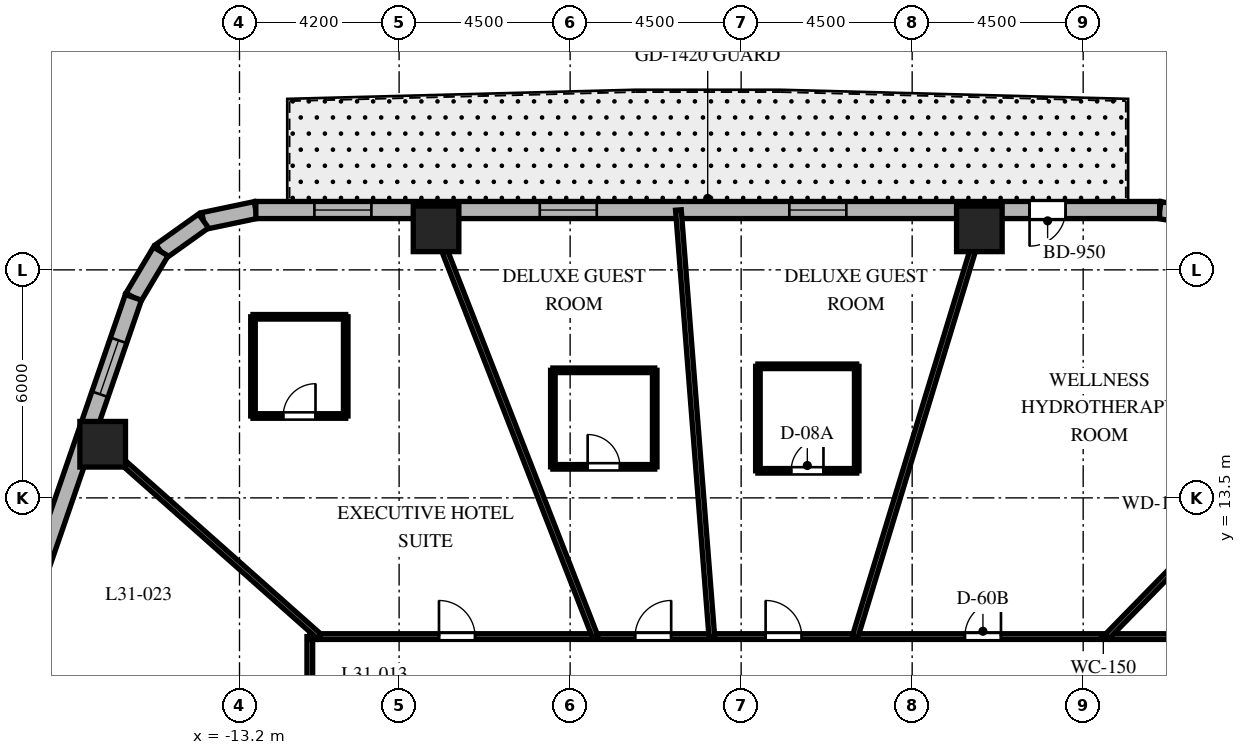
"""IFC4 building model, lengths in metres.
Left out: names, types, materials, properties, quantities, classifications, styles, units other than length and angle.
Written with IfcOpenShell. Run it as: python <this file> out.ifc"""

import sys

from ifc_helpers import new_model, si_unit, direction, frame, frame_2d, origin, origin_2d, place, context, subcontext, project, spatial, rectangle, extrude, element, fill, save


model = new_model("IFC4")
c1 = context("Model", 3, precision=1e-05, world=origin(), true_north=direction((0.0, 1.0)))
c2 = subcontext(c1, "Body", "Model", "MODEL_VIEW")
j1 = project(units=[si_unit("LENGTHUNIT", "METRE"), si_unit("PLANEANGLEUNIT", "RADIAN")], contexts=[c1])
p1 = place(None, origin())
s1 = spatial("IfcSite", under=j1, at=p1, CompositionType="ELEMENT")
p2 = place(p1, origin())
s2 = spatial("IfcBuilding", under=s1, at=p2, CompositionType="ELEMENT")
p3 = place(p2, frame((0.0, 0.0, 128.4)))
s3 = spatial("IfcBuildingStorey", under=s2, at=p3, CompositionType="ELEMENT", Elevation=128.4)
for number, where, z_axis, x_axis in (
    (1, (6.268, 20.58, 0.0), (0.0, 0.0, 1.0), (1.0, 0.0, 0.0)),
    (2, (-8.028, 20.58, 0.0), (0.0, 0.0, 1.0), (1.0, 0.0, 0.0)),
    (3, (-16.8, 14.911, 0.0), (0.0, 0.0, 1.0), (1.0, 0.0, 0.0)),
):
    element("IfcColumn", number, at=place(p3, frame(where, z_axis=z_axis, x_axis=x_axis)), inside=s3, PredefinedType="COLUMN", context=c2, shape_type="SweptSolid", body=[
        extrude(rectangle(XDim=1.2, YDim=1.2, at=origin_2d()), origin(), (0.0, 0.0, 1.0), 3.7),
    ])
p4 = place(p3, frame((12.259, 20.84, 0.0), z_axis=(0.0, 0.0, 1.0), x_axis=(-0.982730354425, 0.185043374624, 0.0)))
e4 = element("IfcWall", 4, at=p4, inside=s3, PredefinedType="SOLIDWALL", context=c2, shape_type="SweptSolid", body=[
    extrude(rectangle(XDim=1.269, YDim=0.45, at=frame_2d((0.635, 0.0))), origin(), (0.0, 0.0, 1.0), 3.4),
])
p5 = place(p3, frame((-12.771, 21.075, 0.0), z_axis=(0.0, 0.0, 1.0), x_axis=(-0.97874281988, -0.205091424819, 0.0)))
e5 = element("IfcWall", 5, at=p5, inside=s3, PredefinedType="SOLIDWALL", context=c2, shape_type="SweptSolid", body=[
    extrude(rectangle(XDim=1.406, YDim=0.45, at=frame_2d((0.703, 0.0))), origin(), (0.0, 0.0, 1.0), 3.4),
])
p6 = place(p3, frame((-14.146, 20.787, 0.0), z_axis=(0.0, 0.0, 1.0), x_axis=(-0.814162929117, -0.580636482536, 0.0)))
e6 = element("IfcWall", 6, at=p6, inside=s3, PredefinedType="SOLIDWALL", context=c2, shape_type="SweptSolid", body=[
    extrude(rectangle(XDim=1.382, YDim=0.45, at=frame_2d((0.691, 0.0))), origin(), (0.0, 0.0, 1.0), 3.4),
])
p7 = place(p3, frame((-15.272, 19.984, 0.0), z_axis=(0.0, 0.0, 1.0), x_axis=(-0.512579347361, -0.858639862025, 0.0)))
e7 = element("IfcWall", 7, at=p7, inside=s3, PredefinedType="SOLIDWALL", context=c2, shape_type="SweptSolid", body=[
    extrude(rectangle(XDim=1.406, YDim=0.45, at=frame_2d((0.703, 0.0))), origin(), (0.0, 0.0, 1.0), 3.4),
])
p8 = place(p3, frame((11.012, 21.075, 0.0), z_axis=(0.0, 0.0, 1.0), x_axis=(-1.0, 0.0, 0.0)))
e8 = element("IfcWall", 8, at=p8, inside=s3, PredefinedType="SOLIDWALL", context=c2, shape_type="SweptSolid", body=[
    extrude(rectangle(XDim=23.782, YDim=0.45, at=frame_2d((11.891, 0.0))), origin(), (0.0, 0.0, 1.0), 3.4),
])
p9 = place(p8, frame((2.473, 0.0, 0.0)))
e9 = element("IfcOpeningElement", 9, at=p9, cuts=e8, PredefinedType="OPENING", context=c2, shape_type="SweptSolid", body=[
    extrude(rectangle(XDim=0.95, YDim=2.15, at=frame_2d((0.475, 1.075))), frame((0.0, 0.235, 0.0), z_axis=(0.0, -1.0, 0.0), x_axis=(1.0, 0.0, 0.0)), (0.0, 0.0, 1.0), 0.47),
])
p10 = place(p8, frame((8.244, 0.0, 0.8)))
e10 = element("IfcOpeningElement", 10, at=p10, cuts=e8, PredefinedType="OPENING", context=c2, shape_type="SweptSolid", body=[
    extrude(rectangle(XDim=1.5, YDim=1.8, at=frame_2d((0.75, 0.9))), frame((0.0, 0.235, 0.0), z_axis=(0.0, -1.0, 0.0), x_axis=(1.0, 0.0, 0.0)), (0.0, 0.0, 1.0), 0.47),
])
p11 = place(p8, frame((14.811, 0.0, 0.8)))
e11 = element("IfcOpeningElement", 11, at=p11, cuts=e8, PredefinedType="OPENING", context=c2, shape_type="SweptSolid", body=[
    extrude(rectangle(XDim=1.5, YDim=1.8, at=frame_2d((0.75, 0.9))), frame((0.0, 0.235, 0.0), z_axis=(0.0, -1.0, 0.0), x_axis=(1.0, 0.0, 0.0)), (0.0, 0.0, 1.0), 0.47),
])
p12 = place(p8, frame((20.741, 0.0, 0.8)))
e12 = element("IfcOpeningElement", 12, at=p12, cuts=e8, PredefinedType="OPENING", context=c2, shape_type="SweptSolid", body=[
    extrude(rectangle(XDim=1.5, YDim=1.8, at=frame_2d((0.75, 0.9))), frame((0.0, 0.235, 0.0), z_axis=(0.0, -1.0, 0.0), x_axis=(1.0, 0.0, 0.0)), (0.0, 0.0, 1.0), 0.47),
])
p13 = place(p3, frame((-15.992, 18.777, 0.0), z_axis=(0.0, 0.0, 1.0), x_axis=(-0.325606988926, -0.945505202927, 0.0)))
e13 = element("IfcWall", 13, at=p13, inside=s3, PredefinedType="SOLIDWALL", context=c2, shape_type="SweptSolid", body=[
    extrude(rectangle(XDim=19.669, YDim=0.45, at=frame_2d((9.835, 0.0))), origin(), (0.0, 0.0, 1.0), 3.4),
])
p14 = place(p13, frame((1.197, 0.0, 0.8)))
e14 = element("IfcOpeningElement", 14, at=p14, cuts=e13, PredefinedType="OPENING", context=c2, shape_type="SweptSolid", body=[
    extrude(rectangle(XDim=1.5, YDim=1.8, at=frame_2d((0.75, 0.9))), frame((0.0, 0.235, 0.0), z_axis=(0.0, -1.0, 0.0), x_axis=(1.0, 0.0, 0.0)), (0.0, 0.0, 1.0), 0.47),
])
p15 = place(p13, frame((9.03, 0.0, 0.8)))
e15 = element("IfcOpeningElement", 15, at=p15, cuts=e13, PredefinedType="OPENING", context=c2, shape_type="SweptSolid", body=[
    extrude(rectangle(XDim=1.5, YDim=1.8, at=frame_2d((0.75, 0.9))), frame((0.0, 0.235, 0.0), z_axis=(0.0, -1.0, 0.0), x_axis=(1.0, 0.0, 0.0)), (0.0, 0.0, 1.0), 0.47),
])
p16 = place(p13, frame((16.918, 0.0, 0.8)))
e16 = element("IfcOpeningElement", 16, at=p16, cuts=e13, PredefinedType="OPENING", context=c2, shape_type="SweptSolid", body=[
    extrude(rectangle(XDim=1.5, YDim=1.8, at=frame_2d((0.75, 0.9))), frame((0.0, 0.235, 0.0), z_axis=(0.0, -1.0, 0.0), x_axis=(1.0, 0.0, 0.0)), (0.0, 0.0, 1.0), 0.47),
])
p17 = place(p3, frame((-11.35, -9.85, 0.0), z_axis=(0.0, 0.0, 1.0), x_axis=(0.0, 1.0, 0.0)))
e17 = element("IfcWall", 17, at=p17, inside=s3, PredefinedType="PARTITIONING", context=c2, shape_type="SweptSolid", body=[
    extrude(rectangle(XDim=19.7, YDim=0.15, at=frame_2d((9.85, 0.0))), origin(), (0.0, 0.0, 1.0), 2.84),
])
p18 = place(p17, frame((15.205, 0.0, 0.0)))
e18 = element("IfcOpeningElement", 18, at=p18, cuts=e17, PredefinedType="OPENING", context=c2, shape_type="SweptSolid", body=[
    extrude(rectangle(XDim=0.95, YDim=2.03, at=frame_2d((0.475, 1.015))), frame((0.0, 0.085, 0.0), z_axis=(0.0, -1.0, 0.0), x_axis=(1.0, 0.0, 0.0)), (0.0, 0.0, 1.0), 0.17),
])
p19 = place(p17, frame((8.836, 0.0, 0.0)))
e19 = element("IfcOpeningElement", 19, at=p19, cuts=e17, PredefinedType="OPENING", context=c2, shape_type="SweptSolid", body=[
    extrude(rectangle(XDim=0.95, YDim=2.03, at=frame_2d((0.475, 1.015))), frame((0.0, 0.085, 0.0), z_axis=(0.0, -1.0, 0.0), x_axis=(1.0, 0.0, 0.0)), (0.0, 0.0, 1.0), 0.17),
])
p20 = place(p17, frame((3.008, 0.0, 0.0)))
e20 = element("IfcOpeningElement", 20, at=p20, cuts=e17, PredefinedType="OPENING", context=c2, shape_type="SweptSolid", body=[
    extrude(rectangle(XDim=0.95, YDim=2.03, at=frame_2d((0.475, 1.015))), frame((0.0, 0.085, 0.0), z_axis=(0.0, -1.0, 0.0), x_axis=(1.0, 0.0, 0.0)), (0.0, 0.0, 1.0), 0.17),
])
p21 = place(p3, frame((-11.35, 9.85, 0.0), z_axis=(0.0, 0.0, 1.0), x_axis=(1.0, 0.0, 0.0)))
e21 = element("IfcWall", 21, at=p21, inside=s3, PredefinedType="PARTITIONING", context=c2, shape_type="SweptSolid", body=[
    extrude(rectangle(XDim=22.7, YDim=0.15, at=frame_2d((11.35, 0.0))), origin(), (0.0, 0.0, 1.0), 2.84),
])
p22 = place(p21, frame((17.237, 0.0, 0.0)))
e22 = element("IfcOpeningElement", 22, at=p22, cuts=e21, PredefinedType="OPENING", context=c2, shape_type="SweptSolid", body=[
    extrude(rectangle(XDim=0.95, YDim=2.03, at=frame_2d((0.475, 1.015))), frame((0.0, 0.085, 0.0), z_axis=(0.0, -1.0, 0.0), x_axis=(1.0, 0.0, 0.0)), (0.0, 0.0, 1.0), 0.17),
])
p23 = place(p21, frame((11.994, 0.0, 0.0)))
e23 = element("IfcOpeningElement", 23, at=p23, cuts=e21, PredefinedType="OPENING", context=c2, shape_type="SweptSolid", body=[
    extrude(rectangle(XDim=0.95, YDim=2.03, at=frame_2d((0.475, 1.015))), frame((0.0, 0.085, 0.0), z_axis=(0.0, -1.0, 0.0), x_axis=(1.0, 0.0, 0.0)), (0.0, 0.0, 1.0), 0.17),
])
p24 = place(p21, frame((8.559, 0.0, 0.0)))
e24 = element("IfcOpeningElement", 24, at=p24, cuts=e21, PredefinedType="OPENING", context=c2, shape_type="SweptSolid", body=[
    extrude(rectangle(XDim=0.95, YDim=2.03, at=frame_2d((0.475, 1.015))), frame((0.0, 0.085, 0.0), z_axis=(0.0, -1.0, 0.0), x_axis=(1.0, 0.0, 0.0)), (0.0, 0.0, 1.0), 0.17),
])
p25 = place(p21, frame((3.399, 0.0, 0.0)))
e25 = element("IfcOpeningElement", 25, at=p25, cuts=e21, PredefinedType="OPENING", context=c2, shape_type="SweptSolid", body=[
    extrude(rectangle(XDim=0.95, YDim=2.03, at=frame_2d((0.475, 1.015))), frame((0.0, 0.085, 0.0), z_axis=(0.0, -1.0, 0.0), x_axis=(1.0, 0.0, 0.0)), (0.0, 0.0, 1.0), 0.17),
])
p26 = place(p3, frame((9.628, 9.85, 0.0), z_axis=(0.0, 0.0, 1.0), x_axis=(0.698992824326, 0.715128681805, 0.0)))
e26 = element("IfcWall", 26, at=p26, inside=s3, PredefinedType="PARTITIONING", context=c2, shape_type="SweptSolid", body=[
    extrude(rectangle(XDim=8.579, YDim=0.15, at=frame_2d((4.29, 0.0))), origin(), (0.0, 0.0, 1.0), 2.54),
])
p27 = place(p3, frame((3.0, 9.85, 0.0), z_axis=(0.0, 0.0, 1.0), x_axis=(0.291352035382, 0.95661590593, 0.0)))
e27 = element("IfcWall", 27, at=p27, inside=s3, PredefinedType="PARTITIONING", context=c2, shape_type="SweptSolid", body=[
    extrude(rectangle(XDim=11.734, YDim=0.15, at=frame_2d((5.867, 0.0))), origin(), (0.0, 0.0, 1.0), 2.54),
])
p28 = place(p3, frame((-0.772, 9.85, 0.0), z_axis=(0.0, 0.0, 1.0), x_axis=(-0.078125747145, 0.996943512759, 0.0)))
e28 = element("IfcWall", 28, at=p28, inside=s3, PredefinedType="PARTITIONING", context=c2, shape_type="SweptSolid", body=[
    extrude(rectangle(XDim=11.259, YDim=0.15, at=frame_2d((5.63, 0.0))), origin(), (0.0, 0.0, 1.0), 2.54),
])
p29 = place(p3, frame((-3.842, 9.85, 0.0), z_axis=(0.0, 0.0, 1.0), x_axis=(-0.363432685593, 0.931620460833, 0.0)))
e29 = element("IfcWall", 29, at=p29, inside=s3, PredefinedType="PARTITIONING", context=c2, shape_type="SweptSolid", body=[
    extrude(rectangle(XDim=12.049, YDim=0.15, at=frame_2d((6.024, 0.0))), origin(), (0.0, 0.0, 1.0), 2.54),
])
p30 = place(p3, frame((-11.098, 9.85, 0.0), z_axis=(0.0, 0.0, 1.0), x_axis=(-0.747904295103, 0.663806572253, 0.0)))
e30 = element("IfcWall", 30, at=p30, inside=s3, PredefinedType="PARTITIONING", context=c2, shape_type="SweptSolid", body=[
    extrude(rectangle(XDim=8.16, YDim=0.15, at=frame_2d((4.08, 0.0))), origin(), (0.0, 0.0, 1.0), 2.54),
])
p31 = place(p3, frame((0.441, 14.212, 0.0), z_axis=(0.0, 0.0, 1.0), x_axis=(1.0, 0.0, 0.0)))
e31 = element("IfcWall", 31, at=p31, inside=s3, PredefinedType="PARTITIONING", context=c2, shape_type="SweptSolid", body=[
    extrude(rectangle(XDim=2.6, YDim=0.12, at=frame_2d((1.3, 0.0))), origin(), (0.0, 0.0, 1.0), 3.4),
])
p32 = place(p31, frame((0.875, 0.0, 0.0)))
e32 = element("IfcOpeningElement", 32, at=p32, cuts=e31, PredefinedType="OPENING", context=c2, shape_type="SweptSolid", body=[
    extrude(rectangle(XDim=0.85, YDim=2.03, at=frame_2d((0.425, 1.015))), frame((0.0, 0.07, 0.0), z_axis=(0.0, -1.0, 0.0), x_axis=(1.0, 0.0, 0.0)), (0.0, 0.0, 1.0), 0.14),
])
p33 = place(p3, frame((3.041, 14.212, 0.0), z_axis=(0.0, 0.0, 1.0), x_axis=(0.0, 1.0, 0.0)))
e33 = element("IfcWall", 33, at=p33, inside=s3, PredefinedType="PARTITIONING", context=c2, shape_type="SweptSolid", body=[
    extrude(rectangle(XDim=2.75, YDim=0.12, at=frame_2d((1.375, 0.0))), origin(), (0.0, 0.0, 1.0), 2.841),
])
p34 = place(p3, frame((3.041, 16.962, 0.0), z_axis=(0.0, 0.0, 1.0), x_axis=(-1.0, 0.0, 0.0)))
e34 = element("IfcWall", 34, at=p34, inside=s3, PredefinedType="PARTITIONING", context=c2, shape_type="SweptSolid", body=[
    extrude(rectangle(XDim=2.6, YDim=0.12, at=frame_2d((1.3, 0.0))), origin(), (0.0, 0.0, 1.0), 3.4),
])
p35 = place(p3, frame((0.441, 16.962, 0.0), z_axis=(0.0, 0.0, 1.0), x_axis=(0.0, -1.0, 0.0)))
e35 = element("IfcWall", 35, at=p35, inside=s3, PredefinedType="PARTITIONING", context=c2, shape_type="SweptSolid", body=[
    extrude(rectangle(XDim=2.75, YDim=0.12, at=frame_2d((1.375, 0.0))), origin(), (0.0, 0.0, 1.0), 2.841),
])
p36 = place(p3, frame((-4.954, 14.317, 0.0), z_axis=(0.0, 0.0, 1.0), x_axis=(1.0, 0.0, 0.0)))
e36 = element("IfcWall", 36, at=p36, inside=s3, PredefinedType="PARTITIONING", context=c2, shape_type="SweptSolid", body=[
    extrude(rectangle(XDim=2.68, YDim=0.12, at=frame_2d((1.34, 0.0))), origin(), (0.0, 0.0, 1.0), 3.4),
])
p37 = place(p36, frame((0.915, 0.0, 0.0)))
e37 = element("IfcOpeningElement", 37, at=p37, cuts=e36, PredefinedType="OPENING", context=c2, shape_type="SweptSolid", body=[
    extrude(rectangle(XDim=0.85, YDim=2.03, at=frame_2d((0.425, 1.015))), frame((0.0, 0.07, 0.0), z_axis=(0.0, -1.0, 0.0), x_axis=(1.0, 0.0, 0.0)), (0.0, 0.0, 1.0), 0.14),
])
p38 = place(p3, frame((-2.274, 14.317, 0.0), z_axis=(0.0, 0.0, 1.0), x_axis=(0.0, 1.0, 0.0)))
e38 = element("IfcWall", 38, at=p38, inside=s3, PredefinedType="PARTITIONING", context=c2, shape_type="SweptSolid", body=[
    extrude(rectangle(XDim=2.54, YDim=0.12, at=frame_2d((1.27, 0.0))), origin(), (0.0, 0.0, 1.0), 2.841),
])
p39 = place(p3, frame((-2.274, 16.857, 0.0), z_axis=(0.0, 0.0, 1.0), x_axis=(-1.0, 0.0, 0.0)))
e39 = element("IfcWall", 39, at=p39, inside=s3, PredefinedType="PARTITIONING", context=c2, shape_type="SweptSolid", body=[
    extrude(rectangle(XDim=2.68, YDim=0.12, at=frame_2d((1.34, 0.0))), origin(), (0.0, 0.0, 1.0), 3.4),
])
p40 = place(p3, frame((-4.954, 16.857, 0.0), z_axis=(0.0, 0.0, 1.0), x_axis=(0.0, -1.0, 0.0)))
e40 = element("IfcWall", 40, at=p40, inside=s3, PredefinedType="PARTITIONING", context=c2, shape_type="SweptSolid", body=[
    extrude(rectangle(XDim=2.54, YDim=0.12, at=frame_2d((1.27, 0.0))), origin(), (0.0, 0.0, 1.0), 2.841),
])
p41 = place(p3, frame((-12.845, 15.655, 0.0), z_axis=(0.0, 0.0, 1.0), x_axis=(1.0, 0.0, 0.0)))
e41 = element("IfcWall", 41, at=p41, inside=s3, PredefinedType="PARTITIONING", context=c2, shape_type="SweptSolid", body=[
    extrude(rectangle(XDim=2.44, YDim=0.12, at=frame_2d((1.22, 0.0))), origin(), (0.0, 0.0, 1.0), 3.4),
])
p42 = place(p41, frame((0.795, 0.0, 0.0)))
e42 = element("IfcOpeningElement", 42, at=p42, cuts=e41, PredefinedType="OPENING", context=c2, shape_type="SweptSolid", body=[
    extrude(rectangle(XDim=0.85, YDim=2.03, at=frame_2d((0.425, 1.015))), frame((0.0, 0.07, 0.0), z_axis=(0.0, -1.0, 0.0), x_axis=(1.0, 0.0, 0.0)), (0.0, 0.0, 1.0), 0.14),
])
p43 = place(p3, frame((-10.405, 15.655, 0.0), z_axis=(0.0, 0.0, 1.0), x_axis=(0.0, 1.0, 0.0)))
e43 = element("IfcWall", 43, at=p43, inside=s3, PredefinedType="PARTITIONING", context=c2, shape_type="SweptSolid", body=[
    extrude(rectangle(XDim=2.61, YDim=0.12, at=frame_2d((1.305, 0.0))), origin(), (0.0, 0.0, 1.0), 3.4),
])
p44 = place(p3, frame((-10.405, 18.265, 0.0), z_axis=(0.0, 0.0, 1.0), x_axis=(-1.0, 0.0, 0.0)))
e44 = element("IfcWall", 44, at=p44, inside=s3, PredefinedType="PARTITIONING", context=c2, shape_type="SweptSolid", body=[
    extrude(rectangle(XDim=2.44, YDim=0.12, at=frame_2d((1.22, 0.0))), origin(), (0.0, 0.0, 1.0), 2.54),
])
p45 = place(p3, frame((-12.845, 18.265, 0.0), z_axis=(0.0, 0.0, 1.0), x_axis=(0.0, -1.0, 0.0)))
e45 = element("IfcWall", 45, at=p45, inside=s3, PredefinedType="PARTITIONING", context=c2, shape_type="SweptSolid", body=[
    extrude(rectangle(XDim=2.61, YDim=0.12, at=frame_2d((1.305, 0.0))), origin(), (0.0, 0.0, 1.0), 2.54),
])
p46 = place(p9, origin())
e46 = element("IfcDoor", 46, at=p46, inside=s3, OperationType="SINGLE_SWING_RIGHT", PredefinedType="DOOR", context=c2, shape_type="SweptSolid", body=[
    extrude(rectangle(XDim=0.95, YDim=2.15, at=frame_2d((0.475, 1.075))), frame((0.0, 0.025, 0.0), z_axis=(0.0, -1.0, 0.0), x_axis=(1.0, 0.0, 0.0)), (0.0, 0.0, 1.0), 0.05),
])
fill(e9, e46)
p47 = place(p10, origin())
e47 = element("IfcWindow", 47, at=p47, inside=s3, PartitioningType="SINGLE_PANEL", PredefinedType="WINDOW", context=c2, shape_type="SweptSolid", body=[
    extrude(rectangle(XDim=1.5, YDim=1.8, at=frame_2d((0.75, 0.9))), frame((0.0, 0.03, 0.0), z_axis=(0.0, -1.0, 0.0), x_axis=(1.0, 0.0, 0.0)), (0.0, 0.0, 1.0), 0.06),
])
fill(e10, e47)
p48 = place(p11, origin())
e48 = element("IfcWindow", 48, at=p48, inside=s3, PartitioningType="SINGLE_PANEL", PredefinedType="WINDOW", context=c2, shape_type="SweptSolid", body=[
    extrude(rectangle(XDim=1.5, YDim=1.8, at=frame_2d((0.75, 0.9))), frame((0.0, 0.03, 0.0), z_axis=(0.0, -1.0, 0.0), x_axis=(1.0, 0.0, 0.0)), (0.0, 0.0, 1.0), 0.06),
])
fill(e11, e48)
p49 = place(p12, origin())
e49 = element("IfcWindow", 49, at=p49, inside=s3, PartitioningType="SINGLE_PANEL", PredefinedType="WINDOW", context=c2, shape_type="SweptSolid", body=[
    extrude(rectangle(XDim=1.5, YDim=1.8, at=frame_2d((0.75, 0.9))), frame((0.0, 0.03, 0.0), z_axis=(0.0, -1.0, 0.0), x_axis=(1.0, 0.0, 0.0)), (0.0, 0.0, 1.0), 0.06),
])
fill(e12, e49)
p50 = place(p14, origin())
e50 = element("IfcWindow", 50, at=p50, inside=s3, PartitioningType="SINGLE_PANEL", PredefinedType="WINDOW", context=c2, shape_type="SweptSolid", body=[
    extrude(rectangle(XDim=1.5, YDim=1.8, at=frame_2d((0.75, 0.9))), frame((0.0, 0.03, 0.0), z_axis=(0.0, -1.0, 0.0), x_axis=(1.0, 0.0, 0.0)), (0.0, 0.0, 1.0), 0.06),
])
fill(e14, e50)
p51 = place(p22, origin())
e51 = element("IfcDoor", 51, at=p51, inside=s3, OperationType="SINGLE_SWING_RIGHT", PredefinedType="DOOR", context=c2, shape_type="SweptSolid", body=[
    extrude(rectangle(XDim=0.95, YDim=2.03, at=frame_2d((0.475, 1.015))), frame((0.0, 0.025, 0.0), z_axis=(0.0, -1.0, 0.0), x_axis=(1.0, 0.0, 0.0)), (0.0, 0.0, 1.0), 0.05),
])
fill(e22, e51)
p52 = place(p23, origin())
e52 = element("IfcDoor", 52, at=p52, inside=s3, OperationType="SINGLE_SWING_LEFT", PredefinedType="DOOR", context=c2, shape_type="SweptSolid", body=[
    extrude(rectangle(XDim=0.95, YDim=2.03, at=frame_2d((0.475, 1.015))), frame((0.0, 0.025, 0.0), z_axis=(0.0, -1.0, 0.0), x_axis=(1.0, 0.0, 0.0)), (0.0, 0.0, 1.0), 0.05),
])
fill(e23, e52)
p53 = place(p32, origin())
e53 = element("IfcDoor", 53, at=p53, inside=s3, OperationType="SINGLE_SWING_RIGHT", PredefinedType="DOOR", context=c2, shape_type="SweptSolid", body=[
    extrude(rectangle(XDim=0.85, YDim=2.03, at=frame_2d((0.425, 1.015))), frame((0.0, 0.025, 0.0), z_axis=(0.0, -1.0, 0.0), x_axis=(1.0, 0.0, 0.0)), (0.0, 0.0, 1.0), 0.05),
])
fill(e32, e53)
p54 = place(p24, origin())
e54 = element("IfcDoor", 54, at=p54, inside=s3, OperationType="SINGLE_SWING_RIGHT", PredefinedType="DOOR", context=c2, shape_type="SweptSolid", body=[
    extrude(rectangle(XDim=0.95, YDim=2.03, at=frame_2d((0.475, 1.015))), frame((0.0, 0.025, 0.0), z_axis=(0.0, -1.0, 0.0), x_axis=(1.0, 0.0, 0.0)), (0.0, 0.0, 1.0), 0.05),
])
fill(e24, e54)
p55 = place(p37, origin())
e55 = element("IfcDoor", 55, at=p55, inside=s3, OperationType="SINGLE_SWING_LEFT", PredefinedType="DOOR", context=c2, shape_type="SweptSolid", body=[
    extrude(rectangle(XDim=0.85, YDim=2.03, at=frame_2d((0.425, 1.015))), frame((0.0, 0.025, 0.0), z_axis=(0.0, -1.0, 0.0), x_axis=(1.0, 0.0, 0.0)), (0.0, 0.0, 1.0), 0.05),
])
fill(e37, e55)
p56 = place(p25, origin())
e56 = element("IfcDoor", 56, at=p56, inside=s3, OperationType="SINGLE_SWING_LEFT", PredefinedType="DOOR", context=c2, shape_type="SweptSolid", body=[
    extrude(rectangle(XDim=0.95, YDim=2.03, at=frame_2d((0.475, 1.015))), frame((0.0, 0.025, 0.0), z_axis=(0.0, -1.0, 0.0), x_axis=(1.0, 0.0, 0.0)), (0.0, 0.0, 1.0), 0.05),
])
fill(e25, e56)
p57 = place(p42, origin())
e57 = element("IfcDoor", 57, at=p57, inside=s3, OperationType="SINGLE_SWING_RIGHT", PredefinedType="DOOR", context=c2, shape_type="SweptSolid", body=[
    extrude(rectangle(XDim=0.85, YDim=2.03, at=frame_2d((0.425, 1.015))), frame((0.0, 0.025, 0.0), z_axis=(0.0, -1.0, 0.0), x_axis=(1.0, 0.0, 0.0)), (0.0, 0.0, 1.0), 0.05),
])
fill(e42, e57)
save(model, sys.argv[1])
